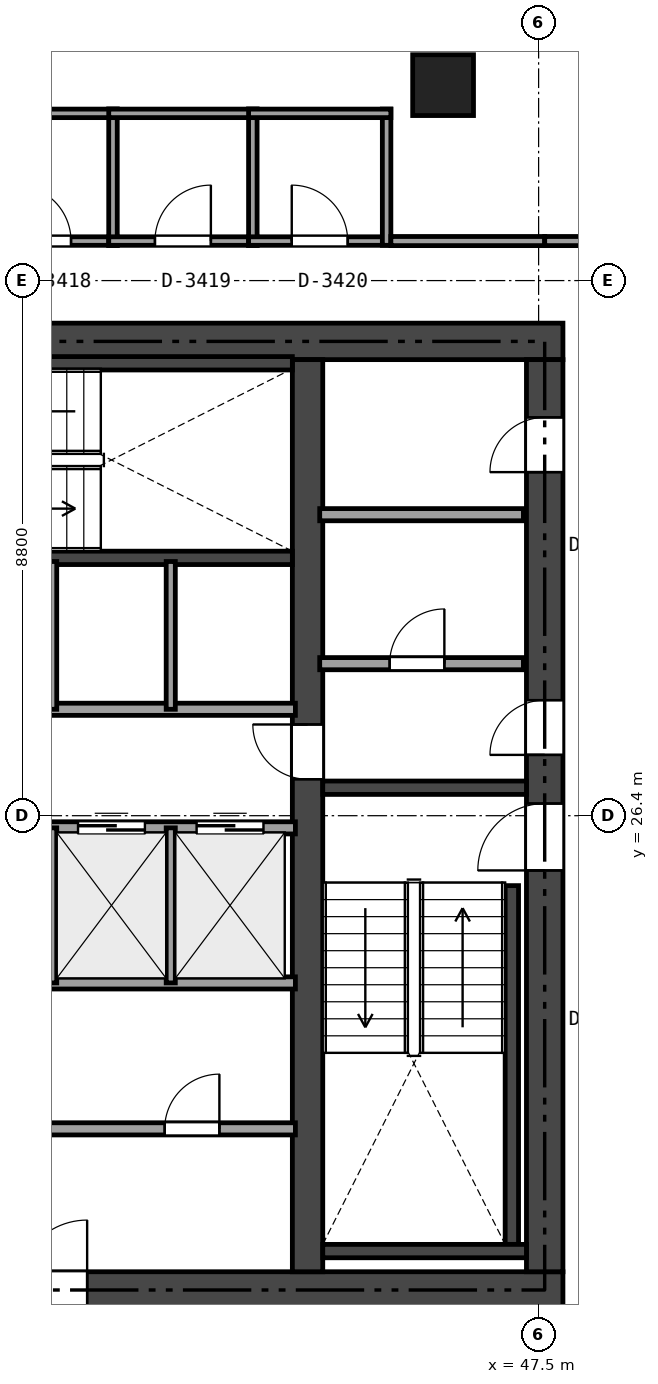
"""IFC4 building model, lengths in metres.
Left out: names, types, materials, properties, quantities, classifications, styles, units other than length and angle.
Written with IfcOpenShell. Run it as: python <this file> out.ifc"""

import sys

from ifc_helpers import new_model, si_unit, direction, frame, frame_2d, origin, origin_2d, place, context, subcontext, project, spatial, rectangle, extrude, element, fill, save


model = new_model("IFC4")
c1 = context("Model", 3, precision=1e-05, world=origin(), true_north=direction((0.0, 1.0)))
c2 = subcontext(c1, "Body", "Model", "MODEL_VIEW")
j1 = project(units=[si_unit("LENGTHUNIT", "METRE"), si_unit("PLANEANGLEUNIT", "RADIAN")], contexts=[c1])
p1 = place(None, origin())
s1 = spatial("IfcSite", under=j1, at=p1, CompositionType="ELEMENT")
p2 = place(p1, origin())
s2 = spatial("IfcBuilding", under=s1, at=p2, CompositionType="ELEMENT")
p3 = place(p2, frame((0.0, 0.0, 129.3)))
s3 = spatial("IfcBuildingStorey", under=s2, at=p3, CompositionType="ELEMENT", Elevation=129.3)
p4 = place(p3, frame((26.5, 18.6, 0.0), z_axis=(0.0, 0.0, 1.0), x_axis=(1.0, 0.0, 0.0)))
e1 = element("IfcWall", 1, at=p4, inside=s3, PredefinedType="SHEAR", context=c2, shape_type="SweptSolid", body=[
    extrude(rectangle(XDim=21.4, YDim=0.6, at=frame_2d((10.7, 0.0))), origin(), (0.0, 0.0, 1.0), 3.32),
])
p5 = place(p4, frame((12.425, 0.0, 0.0)))
e2 = element("IfcOpeningElement", 2, at=p5, cuts=e1, PredefinedType="OPENING", context=c2, shape_type="SweptSolid", body=[
    extrude(rectangle(XDim=1.15, YDim=2.15, at=frame_2d((0.575, 1.075))), frame((0.0, 0.31, 0.0), z_axis=(0.0, -1.0, 0.0), x_axis=(1.0, 0.0, 0.0)), (0.0, 0.0, 1.0), 0.62),
])
p6 = place(p4, frame((5.25, 0.0, 0.0)))
e3 = element("IfcOpeningElement", 3, at=p6, cuts=e1, PredefinedType="OPENING", context=c2, shape_type="SweptSolid", body=[
    extrude(rectangle(XDim=0.9, YDim=2.1, at=frame_2d((0.45, 1.05))), frame((0.0, 0.31, 0.0), z_axis=(0.0, -1.0, 0.0), x_axis=(1.0, 0.0, 0.0)), (0.0, 0.0, 1.0), 0.62),
])
p7 = place(p3, frame((26.5, 34.2, 0.0), z_axis=(0.0, 0.0, 1.0), x_axis=(1.0, 0.0, 0.0)))
e4 = element("IfcWall", 4, at=p7, inside=s3, PredefinedType="SHEAR", context=c2, shape_type="SweptSolid", body=[
    extrude(rectangle(XDim=21.4, YDim=0.6, at=frame_2d((10.7, 0.0))), origin(), (0.0, 0.0, 1.0), 3.32),
])
p8 = place(p7, frame((9.7, 0.0, 0.0)))
e5 = element("IfcOpeningElement", 5, at=p8, cuts=e4, PredefinedType="OPENING", context=c2, shape_type="SweptSolid", body=[
    extrude(rectangle(XDim=1.1, YDim=2.15, at=frame_2d((0.55, 1.075))), frame((0.0, 0.31, 0.0), z_axis=(0.0, -1.0, 0.0), x_axis=(1.0, 0.0, 0.0)), (0.0, 0.0, 1.0), 0.62),
])
p9 = place(p7, frame((1.95, 0.0, 0.0)))
e6 = element("IfcOpeningElement", 6, at=p9, cuts=e4, PredefinedType="OPENING", context=c2, shape_type="SweptSolid", body=[
    extrude(rectangle(XDim=0.9, YDim=2.1, at=frame_2d((0.45, 1.05))), frame((0.0, 0.31, 0.0), z_axis=(0.0, -1.0, 0.0), x_axis=(1.0, 0.0, 0.0)), (0.0, 0.0, 1.0), 0.62),
])
p10 = place(p7, frame((6.25, 0.0, 0.0)))
e7 = element("IfcOpeningElement", 7, at=p10, cuts=e4, PredefinedType="OPENING", context=c2, shape_type="SweptSolid", body=[
    extrude(rectangle(XDim=0.9, YDim=2.1, at=frame_2d((0.45, 1.05))), frame((0.0, 0.31, 0.0), z_axis=(0.0, -1.0, 0.0), x_axis=(1.0, 0.0, 0.0)), (0.0, 0.0, 1.0), 0.62),
])
p11 = place(p3, frame((47.6, 18.9, 0.0), z_axis=(0.0, 0.0, 1.0), x_axis=(0.0, 1.0, 0.0)))
e8 = element("IfcWall", 8, at=p11, inside=s3, PredefinedType="SHEAR", context=c2, shape_type="SweptSolid", body=[
    extrude(rectangle(XDim=15.0, YDim=0.6, at=frame_2d((7.5, 0.0))), origin(), (0.0, 0.0, 1.0), 3.32),
])
p12 = place(p11, frame((6.6, 0.0, 0.0)))
e9 = element("IfcOpeningElement", 9, at=p12, cuts=e8, PredefinedType="OPENING", context=c2, shape_type="SweptSolid", body=[
    extrude(rectangle(XDim=1.1, YDim=2.15, at=frame_2d((0.55, 1.075))), frame((0.0, 0.31, 0.0), z_axis=(0.0, -1.0, 0.0), x_axis=(1.0, 0.0, 0.0)), (0.0, 0.0, 1.0), 0.62),
])
p13 = place(p11, frame((8.5, 0.0, 0.0)))
e10 = element("IfcOpeningElement", 10, at=p13, cuts=e8, PredefinedType="OPENING", context=c2, shape_type="SweptSolid", body=[
    extrude(rectangle(XDim=0.9, YDim=2.1, at=frame_2d((0.45, 1.05))), frame((0.0, 0.31, 0.0), z_axis=(0.0, -1.0, 0.0), x_axis=(1.0, 0.0, 0.0)), (0.0, 0.0, 1.0), 0.62),
])
p14 = place(p11, frame((13.15, 0.0, 0.0)))
e11 = element("IfcOpeningElement", 11, at=p14, cuts=e8, PredefinedType="OPENING", context=c2, shape_type="SweptSolid", body=[
    extrude(rectangle(XDim=0.9, YDim=2.1, at=frame_2d((0.45, 1.05))), frame((0.0, 0.31, 0.0), z_axis=(0.0, -1.0, 0.0), x_axis=(1.0, 0.0, 0.0)), (0.0, 0.0, 1.0), 0.62),
])
p15 = place(p3, frame((43.7, 18.9, 0.0), z_axis=(0.0, 0.0, 1.0), x_axis=(0.0, 1.0, 0.0)))
e12 = element("IfcWall", 12, at=p15, inside=s3, PredefinedType="SHEAR", context=c2, shape_type="SweptSolid", body=[
    extrude(rectangle(XDim=15.0, YDim=0.5, at=frame_2d((7.5, 0.0))), origin(), (0.0, 0.0, 1.0), 3.32),
])
p16 = place(p15, frame((8.1, 0.0, 0.0)))
e13 = element("IfcOpeningElement", 13, at=p16, cuts=e12, PredefinedType="OPENING", context=c2, shape_type="SweptSolid", body=[
    extrude(rectangle(XDim=0.9, YDim=2.1, at=frame_2d((0.45, 1.05))), frame((0.0, 0.26, 0.0), z_axis=(0.0, -1.0, 0.0), x_axis=(1.0, 0.0, 0.0)), (0.0, 0.0, 1.0), 0.52),
])
p17 = place(p3, frame((43.95, 26.86, 0.0), z_axis=(0.0, 0.0, 1.0), x_axis=(1.0, 0.0, 0.0)))
e14 = element("IfcWall", 14, at=p17, inside=s3, PredefinedType="SHEAR", context=c2, shape_type="SweptSolid", body=[
    extrude(rectangle(XDim=3.35, YDim=0.22, at=frame_2d((1.675, 0.0))), origin(), (0.0, 0.0, 1.0), 3.32),
])
p18 = place(p3, frame((47.06, 19.35, 0.0), z_axis=(0.0, 0.0, 1.0), x_axis=(0.0, 1.0, 0.0)))
e15 = element("IfcWall", 15, at=p18, inside=s3, PredefinedType="SHEAR", context=c2, shape_type="SweptSolid", body=[
    extrude(rectangle(XDim=5.9, YDim=0.22, at=frame_2d((2.95, 0.0))), origin(), (0.0, 0.0, 1.0), 3.32),
])
p19 = place(p3, frame((43.95, 19.24, 0.0), z_axis=(0.0, 0.0, 1.0), x_axis=(1.0, 0.0, 0.0)))
e16 = element("IfcWall", 16, at=p19, inside=s3, PredefinedType="SHEAR", context=c2, shape_type="SweptSolid", body=[
    extrude(rectangle(XDim=3.35, YDim=0.22, at=frame_2d((1.675, 0.0))), origin(), (0.0, 0.0, 1.0), 3.32),
])
p20 = place(p3, frame((35.84, 30.64, 0.0), z_axis=(0.0, 0.0, 1.0), x_axis=(1.0, 0.0, 0.0)))
e17 = element("IfcWall", 17, at=p20, inside=s3, PredefinedType="SHEAR", context=c2, shape_type="SweptSolid", body=[
    extrude(rectangle(XDim=7.61, YDim=0.22, at=frame_2d((3.805, 0.0))), origin(), (0.0, 0.0, 1.0), 3.32),
])
p21 = place(p3, frame((37.55, 33.84, 0.0), z_axis=(0.0, 0.0, 1.0), x_axis=(1.0, 0.0, 0.0)))
e18 = element("IfcWall", 18, at=p21, inside=s3, PredefinedType="SHEAR", context=c2, shape_type="SweptSolid", body=[
    extrude(rectangle(XDim=5.9, YDim=0.22, at=frame_2d((2.95, 0.0))), origin(), (0.0, 0.0, 1.0), 3.32),
])
p22 = place(p3, frame((45.929, 38.414, 0.0), z_axis=(0.0, 0.0, 1.0), x_axis=(1.0, 0.0, 0.0)))
e19 = element("IfcColumn", 19, at=p22, inside=s3, PredefinedType="COLUMN", context=c2, shape_type="SweptSolid", body=[
    extrude(rectangle(XDim=1.0, YDim=1.0, at=origin_2d()), origin(), (0.0, 0.0, 1.0), 3.32),
])
p23 = place(p3, frame((43.9, 28.9, 0.0), z_axis=(0.0, 0.0, 1.0), x_axis=(1.0, 0.0, 0.0)))
e20 = element("IfcWall", 20, at=p23, inside=s3, PredefinedType="SOLIDWALL", context=c2, shape_type="SweptSolid", body=[
    extrude(rectangle(XDim=3.35, YDim=0.2, at=frame_2d((1.675, 0.0))), origin(), (0.0, 0.0, 1.0), 3.32),
])
p24 = place(p23, frame((1.15, 0.0, 0.0)))
e21 = element("IfcOpeningElement", 21, at=p24, cuts=e20, PredefinedType="OPENING", context=c2, shape_type="SweptSolid", body=[
    extrude(rectangle(XDim=0.9, YDim=2.1, at=frame_2d((0.45, 1.05))), frame((0.0, 0.11, 0.0), z_axis=(0.0, -1.0, 0.0), x_axis=(1.0, 0.0, 0.0)), (0.0, 0.0, 1.0), 0.22),
])
p25 = place(p3, frame((43.9, 31.35, 0.0), z_axis=(0.0, 0.0, 1.0), x_axis=(1.0, 0.0, 0.0)))
e22 = element("IfcWall", 22, at=p25, inside=s3, PredefinedType="SOLIDWALL", context=c2, shape_type="SweptSolid", body=[
    extrude(rectangle(XDim=3.35, YDim=0.2, at=frame_2d((1.675, 0.0))), origin(), (0.0, 0.0, 1.0), 2.949),
])
p26 = place(p3, frame((35.62, 28.15, 0.0), z_axis=(0.0, 0.0, 1.0), x_axis=(1.0, 0.0, 0.0)))
e23 = element("IfcWall", 23, at=p26, inside=s3, PredefinedType="SOLIDWALL", context=c2, shape_type="SweptSolid", body=[
    extrude(rectangle(XDim=7.88, YDim=0.2, at=frame_2d((3.94, 0.0))), origin(), (0.0, 0.0, 1.0), 3.32),
])
p27 = place(p3, frame((35.62, 26.2, 0.0), z_axis=(0.0, 0.0, 1.0), x_axis=(1.0, 0.0, 0.0)))
e24 = element("IfcWall", 24, at=p27, inside=s3, PredefinedType="SOLIDWALL", context=c2, shape_type="SweptSolid", body=[
    extrude(rectangle(XDim=7.88, YDim=0.2, at=frame_2d((3.94, 0.0))), origin(), (0.0, 0.0, 1.0), 3.32),
])
p28 = place(p27, frame((0.405, 0.0, 0.0)))
e25 = element("IfcOpeningElement", 25, at=p28, cuts=e24, PredefinedType="OPENING", context=c2, shape_type="SweptSolid", body=[
    extrude(rectangle(XDim=1.1, YDim=2.15, at=frame_2d((0.55, 1.075))), frame((0.0, 0.11, 0.0), z_axis=(0.0, -1.0, 0.0), x_axis=(1.0, 0.0, 0.0)), (0.0, 0.0, 1.0), 0.22),
])
p29 = place(p27, frame((2.355, 0.0, 0.0)))
e26 = element("IfcOpeningElement", 26, at=p29, cuts=e24, PredefinedType="OPENING", context=c2, shape_type="SweptSolid", body=[
    extrude(rectangle(XDim=1.1, YDim=2.15, at=frame_2d((0.55, 1.075))), frame((0.0, 0.11, 0.0), z_axis=(0.0, -1.0, 0.0), x_axis=(1.0, 0.0, 0.0)), (0.0, 0.0, 1.0), 0.22),
])
p30 = place(p27, frame((4.305, 0.0, 0.0)))
e27 = element("IfcOpeningElement", 27, at=p30, cuts=e24, PredefinedType="OPENING", context=c2, shape_type="SweptSolid", body=[
    extrude(rectangle(XDim=1.1, YDim=2.15, at=frame_2d((0.55, 1.075))), frame((0.0, 0.11, 0.0), z_axis=(0.0, -1.0, 0.0), x_axis=(1.0, 0.0, 0.0)), (0.0, 0.0, 1.0), 0.22),
])
p31 = place(p27, frame((6.255, 0.0, 0.0)))
e28 = element("IfcOpeningElement", 28, at=p31, cuts=e24, PredefinedType="OPENING", context=c2, shape_type="SweptSolid", body=[
    extrude(rectangle(XDim=1.1, YDim=2.15, at=frame_2d((0.55, 1.075))), frame((0.0, 0.11, 0.0), z_axis=(0.0, -1.0, 0.0), x_axis=(1.0, 0.0, 0.0)), (0.0, 0.0, 1.0), 0.22),
])
p32 = place(p3, frame((35.62, 23.65, 0.0), z_axis=(0.0, 0.0, 1.0), x_axis=(1.0, 0.0, 0.0)))
e29 = element("IfcWall", 29, at=p32, inside=s3, PredefinedType="SOLIDWALL", context=c2, shape_type="SweptSolid", body=[
    extrude(rectangle(XDim=7.88, YDim=0.2, at=frame_2d((3.94, 0.0))), origin(), (0.0, 0.0, 1.0), 2.841),
])
p33 = place(p3, frame((35.62, 21.25, 0.0), z_axis=(0.0, 0.0, 1.0), x_axis=(1.0, 0.0, 0.0)))
e30 = element("IfcWall", 30, at=p33, inside=s3, PredefinedType="SOLIDWALL", context=c2, shape_type="SweptSolid", body=[
    extrude(rectangle(XDim=7.88, YDim=0.2, at=frame_2d((3.94, 0.0))), origin(), (0.0, 0.0, 1.0), 3.32),
])
p34 = place(p33, frame((1.13, 0.0, 0.0)))
e31 = element("IfcOpeningElement", 31, at=p34, cuts=e30, PredefinedType="OPENING", context=c2, shape_type="SweptSolid", body=[
    extrude(rectangle(XDim=0.9, YDim=2.1, at=frame_2d((0.45, 1.05))), frame((0.0, 0.11, 0.0), z_axis=(0.0, -1.0, 0.0), x_axis=(1.0, 0.0, 0.0)), (0.0, 0.0, 1.0), 0.22),
])
p35 = place(p33, frame((5.73, 0.0, 0.0)))
e32 = element("IfcOpeningElement", 32, at=p35, cuts=e30, PredefinedType="OPENING", context=c2, shape_type="SweptSolid", body=[
    extrude(rectangle(XDim=0.9, YDim=2.1, at=frame_2d((0.45, 1.05))), frame((0.0, 0.11, 0.0), z_axis=(0.0, -1.0, 0.0), x_axis=(1.0, 0.0, 0.0)), (0.0, 0.0, 1.0), 0.22),
])
for number, where, z_axis, x_axis in (
    (33, (39.5, 28.15, 0.0), (0.0, 0.0, 1.0), (0.0, 1.0, 0.0)),
    (34, (41.45, 28.15, 0.0), (0.0, 0.0, 1.0), (0.0, 1.0, 0.0)),
):
    element("IfcWall", number, at=place(p3, frame(where, z_axis=z_axis, x_axis=x_axis)), inside=s3, PredefinedType="PARTITIONING", context=c2, shape_type="SweptSolid", body=[
        extrude(rectangle(XDim=2.43, YDim=0.15, at=frame_2d((1.215, 0.0))), origin(), (0.0, 0.0, 1.0), 3.32),
    ])
for number, where, z_axis, x_axis in (
    (35, (39.5, 23.65, 0.0), (0.0, 0.0, 1.0), (0.0, 1.0, 0.0)),
    (36, (41.45, 23.65, 0.0), (0.0, 0.0, 1.0), (0.0, 1.0, 0.0)),
):
    element("IfcWall", number, at=place(p3, frame(where, z_axis=z_axis, x_axis=x_axis)), inside=s3, PredefinedType="PARTITIONING", context=c2, shape_type="SweptSolid", body=[
        extrude(rectangle(XDim=2.55, YDim=0.15, at=frame_2d((1.275, 0.0))), origin(), (0.0, 0.0, 1.0), 2.841),
    ])
p36 = place(p3, frame((38.13, 35.85, 0.0), z_axis=(0.0, 0.0, 1.0), x_axis=(1.0, 0.0, 0.0)))
e37 = element("IfcWall", 37, at=p36, inside=s3, PredefinedType="PARTITIONING", context=c2, shape_type="SweptSolid", body=[
    extrude(rectangle(XDim=2.44, YDim=0.14, at=frame_2d((1.22, 0.0))), origin(), (0.0, 0.0, 1.0), 3.32),
])
p37 = place(p36, frame((0.76, 0.0, 0.0)))
e38 = element("IfcOpeningElement", 38, at=p37, cuts=e37, PredefinedType="OPENING", context=c2, shape_type="SweptSolid", body=[
    extrude(rectangle(XDim=0.92, YDim=2.1, at=frame_2d((0.46, 1.05))), frame((0.0, 0.08, 0.0), z_axis=(0.0, -1.0, 0.0), x_axis=(1.0, 0.0, 0.0)), (0.0, 0.0, 1.0), 0.16),
])
p38 = place(p3, frame((40.5, 35.78, 0.0), z_axis=(0.0, 0.0, 1.0), x_axis=(0.0, 1.0, 0.0)))
e39 = element("IfcWall", 39, at=p38, inside=s3, PredefinedType="PARTITIONING", context=c2, shape_type="SweptSolid", body=[
    extrude(rectangle(XDim=2.24, YDim=0.14, at=frame_2d((1.12, 0.0))), origin(), (0.0, 0.0, 1.0), 2.949),
])
p39 = place(p3, frame((40.57, 37.95, 0.0), z_axis=(0.0, 0.0, 1.0), x_axis=(-1.0, 0.0, 0.0)))
e40 = element("IfcWall", 40, at=p39, inside=s3, PredefinedType="PARTITIONING", context=c2, shape_type="SweptSolid", body=[
    extrude(rectangle(XDim=2.44, YDim=0.14, at=frame_2d((1.22, 0.0))), origin(), (0.0, 0.0, 1.0), 2.949),
])
p40 = place(p3, frame((40.43, 35.85, 0.0), z_axis=(0.0, 0.0, 1.0), x_axis=(1.0, 0.0, 0.0)))
e41 = element("IfcWall", 41, at=p40, inside=s3, PredefinedType="PARTITIONING", context=c2, shape_type="SweptSolid", body=[
    extrude(rectangle(XDim=2.44, YDim=0.14, at=frame_2d((1.22, 0.0))), origin(), (0.0, 0.0, 1.0), 2.949),
])
p41 = place(p40, frame((0.76, 0.0, 0.0)))
e42 = element("IfcOpeningElement", 42, at=p41, cuts=e41, PredefinedType="OPENING", context=c2, shape_type="SweptSolid", body=[
    extrude(rectangle(XDim=0.92, YDim=2.1, at=frame_2d((0.46, 1.05))), frame((0.0, 0.08, 0.0), z_axis=(0.0, -1.0, 0.0), x_axis=(1.0, 0.0, 0.0)), (0.0, 0.0, 1.0), 0.16),
])
p42 = place(p3, frame((42.8, 35.78, 0.0), z_axis=(0.0, 0.0, 1.0), x_axis=(0.0, 1.0, 0.0)))
e43 = element("IfcWall", 43, at=p42, inside=s3, PredefinedType="PARTITIONING", context=c2, shape_type="SweptSolid", body=[
    extrude(rectangle(XDim=2.24, YDim=0.14, at=frame_2d((1.12, 0.0))), origin(), (0.0, 0.0, 1.0), 2.949),
])
p43 = place(p3, frame((42.87, 37.95, 0.0), z_axis=(0.0, 0.0, 1.0), x_axis=(-1.0, 0.0, 0.0)))
e44 = element("IfcWall", 44, at=p43, inside=s3, PredefinedType="PARTITIONING", context=c2, shape_type="SweptSolid", body=[
    extrude(rectangle(XDim=2.44, YDim=0.14, at=frame_2d((1.22, 0.0))), origin(), (0.0, 0.0, 1.0), 2.949),
])
p44 = place(p3, frame((42.73, 35.85, 0.0), z_axis=(0.0, 0.0, 1.0), x_axis=(1.0, 0.0, 0.0)))
e45 = element("IfcWall", 45, at=p44, inside=s3, PredefinedType="PARTITIONING", context=c2, shape_type="SweptSolid", body=[
    extrude(rectangle(XDim=2.34, YDim=0.14, at=frame_2d((1.17, 0.0))), origin(), (0.0, 0.0, 1.0), 2.687),
])
p45 = place(p44, frame((0.71, 0.0, 0.0)))
e46 = element("IfcOpeningElement", 46, at=p45, cuts=e45, PredefinedType="OPENING", context=c2, shape_type="SweptSolid", body=[
    extrude(rectangle(XDim=0.92, YDim=2.1, at=frame_2d((0.46, 1.05))), frame((0.0, 0.08, 0.0), z_axis=(0.0, -1.0, 0.0), x_axis=(1.0, 0.0, 0.0)), (0.0, 0.0, 1.0), 0.16),
])
p46 = place(p3, frame((45.0, 35.78, 0.0), z_axis=(0.0, 0.0, 1.0), x_axis=(0.0, 1.0, 0.0)))
e47 = element("IfcWall", 47, at=p46, inside=s3, PredefinedType="PARTITIONING", context=c2, shape_type="SweptSolid", body=[
    extrude(rectangle(XDim=2.24, YDim=0.14, at=frame_2d((1.12, 0.0))), origin(), (0.0, 0.0, 1.0), 2.687),
])
p47 = place(p3, frame((45.07, 37.95, 0.0), z_axis=(0.0, 0.0, 1.0), x_axis=(-1.0, 0.0, 0.0)))
e48 = element("IfcWall", 48, at=p47, inside=s3, PredefinedType="PARTITIONING", context=c2, shape_type="SweptSolid", body=[
    extrude(rectangle(XDim=2.34, YDim=0.14, at=frame_2d((1.17, 0.0))), origin(), (0.0, 0.0, 1.0), 3.32),
])
p48 = place(p3, frame((39.663, 44.77, 0.0), z_axis=(0.0, 0.0, 1.0), x_axis=(-0.119383467709, -0.992848219839, 0.0)))
e49 = element("IfcWall", 49, at=p48, inside=s3, PredefinedType="PARTITIONING", context=c2, shape_type="SweptSolid", body=[
    extrude(rectangle(XDim=6.869, YDim=0.15, at=frame_2d((3.435, 0.0))), origin(), (0.0, 0.0, 1.0), 2.805),
])
p49 = place(p3, frame((45.07, 35.85, 0.0), z_axis=(0.0, 0.0, 1.0), x_axis=(1.0, 0.0, 0.0)))
e50 = element("IfcWall", 50, at=p49, inside=s3, PredefinedType="PARTITIONING", context=c2, shape_type="SweptSolid", body=[
    extrude(rectangle(XDim=2.53, YDim=0.15, at=frame_2d((1.265, 0.0))), origin(), (0.0, 0.0, 1.0), 2.805),
])
p50 = place(p3, frame((47.6, 35.85, 0.0), z_axis=(0.0, 0.0, 1.0), x_axis=(1.0, 0.0, 0.0)))
e51 = element("IfcWall", 51, at=p50, inside=s3, PredefinedType="PARTITIONING", context=c2, shape_type="SweptSolid", body=[
    extrude(rectangle(XDim=1.65, YDim=0.15, at=frame_2d((0.825, 0.0))), origin(), (0.0, 0.0, 1.0), 2.805),
])
p51 = place(p12, origin())
e52 = element("IfcDoor", 52, at=p51, inside=s3, OperationType="SINGLE_SWING_LEFT", PredefinedType="DOOR", context=c2, shape_type="SweptSolid", body=[
    extrude(rectangle(XDim=1.1, YDim=2.15, at=frame_2d((0.55, 1.075))), frame((0.0, 0.025, 0.0), z_axis=(0.0, -1.0, 0.0), x_axis=(1.0, 0.0, 0.0)), (0.0, 0.0, 1.0), 0.05),
])
fill(e9, e52)
p52 = place(p16, origin())
e53 = element("IfcDoor", 53, at=p52, inside=s3, OperationType="SINGLE_SWING_RIGHT", PredefinedType="DOOR", context=c2, shape_type="SweptSolid", body=[
    extrude(rectangle(XDim=0.9, YDim=2.1, at=frame_2d((0.45, 1.05))), frame((0.0, 0.025, 0.0), z_axis=(0.0, -1.0, 0.0), x_axis=(1.0, 0.0, 0.0)), (0.0, 0.0, 1.0), 0.05),
])
fill(e13, e53)
p53 = place(p13, origin())
e54 = element("IfcDoor", 54, at=p53, inside=s3, OperationType="SINGLE_SWING_LEFT", PredefinedType="DOOR", context=c2, shape_type="SweptSolid", body=[
    extrude(rectangle(XDim=0.9, YDim=2.1, at=frame_2d((0.45, 1.05))), frame((0.0, 0.025, 0.0), z_axis=(0.0, -1.0, 0.0), x_axis=(1.0, 0.0, 0.0)), (0.0, 0.0, 1.0), 0.05),
])
fill(e10, e54)
p54 = place(p5, origin())
e55 = element("IfcDoor", 55, at=p54, inside=s3, OperationType="SINGLE_SWING_RIGHT", PredefinedType="DOOR", context=c2, shape_type="SweptSolid", body=[
    extrude(rectangle(XDim=1.15, YDim=2.15, at=frame_2d((0.575, 1.075))), frame((0.0, 0.025, 0.0), z_axis=(0.0, -1.0, 0.0), x_axis=(1.0, 0.0, 0.0)), (0.0, 0.0, 1.0), 0.05),
])
fill(e2, e55)
p55 = place(p24, origin())
e56 = element("IfcDoor", 56, at=p55, inside=s3, OperationType="SINGLE_SWING_RIGHT", PredefinedType="DOOR", context=c2, shape_type="SweptSolid", body=[
    extrude(rectangle(XDim=0.9, YDim=2.1, at=frame_2d((0.45, 1.05))), frame((0.0, 0.025, 0.0), z_axis=(0.0, -1.0, 0.0), x_axis=(1.0, 0.0, 0.0)), (0.0, 0.0, 1.0), 0.05),
])
fill(e21, e56)
p56 = place(p14, origin())
e57 = element("IfcDoor", 57, at=p56, inside=s3, OperationType="SINGLE_SWING_LEFT", PredefinedType="DOOR", context=c2, shape_type="SweptSolid", body=[
    extrude(rectangle(XDim=0.9, YDim=2.1, at=frame_2d((0.45, 1.05))), frame((0.0, 0.025, 0.0), z_axis=(0.0, -1.0, 0.0), x_axis=(1.0, 0.0, 0.0)), (0.0, 0.0, 1.0), 0.05),
])
fill(e11, e57)
p57 = place(p35, origin())
e58 = element("IfcDoor", 58, at=p57, inside=s3, OperationType="SINGLE_SWING_RIGHT", PredefinedType="DOOR", context=c2, shape_type="SweptSolid", body=[
    extrude(rectangle(XDim=0.9, YDim=2.1, at=frame_2d((0.45, 1.05))), frame((0.0, 0.025, 0.0), z_axis=(0.0, -1.0, 0.0), x_axis=(1.0, 0.0, 0.0)), (0.0, 0.0, 1.0), 0.05),
])
fill(e32, e58)
p58 = place(p30, origin())
e59 = element("IfcDoor", 59, at=p58, inside=s3, OperationType="SLIDING_TO_LEFT", PredefinedType="DOOR", context=c2, shape_type="SweptSolid", body=[
    extrude(rectangle(XDim=1.1, YDim=2.15, at=frame_2d((0.55, 1.075))), frame((0.0, 0.025, 0.0), z_axis=(0.0, -1.0, 0.0), x_axis=(1.0, 0.0, 0.0)), (0.0, 0.0, 1.0), 0.05),
])
fill(e27, e59)
p59 = place(p31, origin())
e60 = element("IfcDoor", 60, at=p59, inside=s3, OperationType="SLIDING_TO_LEFT", PredefinedType="DOOR", context=c2, shape_type="SweptSolid", body=[
    extrude(rectangle(XDim=1.1, YDim=2.15, at=frame_2d((0.55, 1.075))), frame((0.0, 0.025, 0.0), z_axis=(0.0, -1.0, 0.0), x_axis=(1.0, 0.0, 0.0)), (0.0, 0.0, 1.0), 0.05),
])
fill(e28, e60)
p60 = place(p37, origin())
e61 = element("IfcDoor", 61, at=p60, inside=s3, OperationType="SINGLE_SWING_LEFT", PredefinedType="DOOR", context=c2, shape_type="SweptSolid", body=[
    extrude(rectangle(XDim=0.92, YDim=2.1, at=frame_2d((0.46, 1.05))), frame((0.0, 0.025, 0.0), z_axis=(0.0, -1.0, 0.0), x_axis=(1.0, 0.0, 0.0)), (0.0, 0.0, 1.0), 0.05),
])
fill(e38, e61)
p61 = place(p41, origin())
e62 = element("IfcDoor", 62, at=p61, inside=s3, OperationType="SINGLE_SWING_RIGHT", PredefinedType="DOOR", context=c2, shape_type="SweptSolid", body=[
    extrude(rectangle(XDim=0.92, YDim=2.1, at=frame_2d((0.46, 1.05))), frame((0.0, 0.025, 0.0), z_axis=(0.0, -1.0, 0.0), x_axis=(1.0, 0.0, 0.0)), (0.0, 0.0, 1.0), 0.05),
])
fill(e42, e62)
p62 = place(p45, origin())
e63 = element("IfcDoor", 63, at=p62, inside=s3, OperationType="SINGLE_SWING_LEFT", PredefinedType="DOOR", context=c2, shape_type="SweptSolid", body=[
    extrude(rectangle(XDim=0.92, YDim=2.1, at=frame_2d((0.46, 1.05))), frame((0.0, 0.025, 0.0), z_axis=(0.0, -1.0, 0.0), x_axis=(1.0, 0.0, 0.0)), (0.0, 0.0, 1.0), 0.05),
])
fill(e46, e63)
save(model, sys.argv[1])
